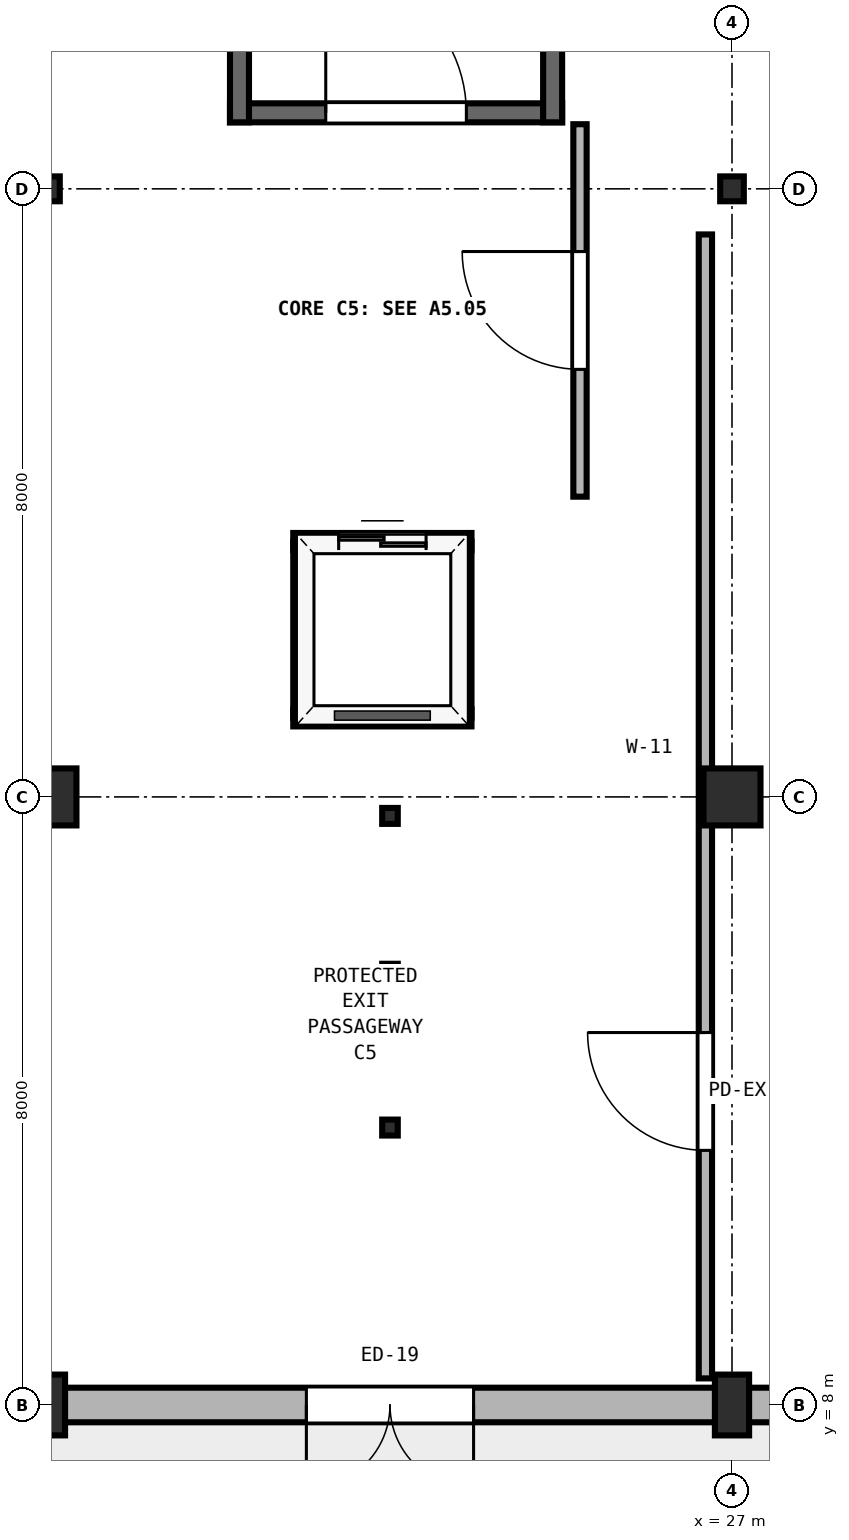
"""IFC4 building model, lengths in metres.
Left out: names, types, materials, properties, quantities, classifications, styles, units other than length and angle.
Written with IfcOpenShell. Run it as: python <this file> out.ifc"""

import sys

from ifc_helpers import new_model, si_unit, direction, frame, frame_2d, origin, origin_2d, place, context, subcontext, project, spatial, rectangle, i_section, extrude, element, fill, save


model = new_model("IFC4")
c1 = context("Model", 3, precision=1e-05, world=origin(), true_north=direction((0.0, 1.0)))
c2 = subcontext(c1, "Body", "Model", "MODEL_VIEW")
j1 = project(units=[si_unit("LENGTHUNIT", "METRE"), si_unit("PLANEANGLEUNIT", "RADIAN")], contexts=[c1])
p1 = place(None, origin())
s1 = spatial("IfcSite", under=j1, at=p1, CompositionType="ELEMENT")
p2 = place(p1, origin())
s2 = spatial("IfcBuilding", under=s1, at=p2, CompositionType="ELEMENT")
p3 = place(p2, origin())
s3 = spatial("IfcBuildingStorey", under=s2, at=p3, CompositionType="ELEMENT", Elevation=0.0)
p4 = place(p3, frame((18.0, 8.0, 0.0), z_axis=(0.0, 0.0, 1.0), x_axis=(1.0, 0.0, 0.0)))
e1 = element("IfcColumn", 1, at=p4, inside=s3, PredefinedType="PILASTER", context=c2, shape_type="SweptSolid", body=[
    extrude(rectangle(XDim=0.45, YDim=0.8, at=origin_2d()), origin(), (0.0, 0.0, 1.0), 5.12),
])
p5 = place(p3, frame((18.0, 16.0, 0.0), z_axis=(0.0, 0.0, 1.0), x_axis=(1.0, 0.0, 0.0)))
e2 = element("IfcColumn", 2, at=p5, inside=s3, PredefinedType="COLUMN", context=c2, shape_type="SweptSolid", body=[
    extrude(rectangle(XDim=0.75, YDim=0.75, at=origin_2d()), origin(), (0.0, 0.0, 1.0), 5.12),
])
p6 = place(p3, frame((18.0, 24.0, 0.0), z_axis=(0.0, 0.0, 1.0), x_axis=(1.0, 0.0, 0.0)))
e3 = element("IfcColumn", 3, at=p6, inside=s3, PredefinedType="COLUMN", context=c2, shape_type="SweptSolid", body=[
    extrude(i_section(OverallWidth=0.311, OverallDepth=0.327, WebThickness=0.016, FlangeThickness=0.025, FilletRadius=0.017, at=origin_2d()), origin(), (0.0, 0.0, 1.0), 5.12),
])
p7 = place(p3, frame((27.0, 8.0, 0.0), z_axis=(0.0, 0.0, 1.0), x_axis=(1.0, 0.0, 0.0)))
e4 = element("IfcColumn", 4, at=p7, inside=s3, PredefinedType="PILASTER", context=c2, shape_type="SweptSolid", body=[
    extrude(rectangle(XDim=0.45, YDim=0.8, at=origin_2d()), origin(), (0.0, 0.0, 1.0), 5.12),
])
p8 = place(p3, frame((27.0, 16.0, 0.0), z_axis=(0.0, 0.0, 1.0), x_axis=(1.0, 0.0, 0.0)))
e5 = element("IfcColumn", 5, at=p8, inside=s3, PredefinedType="COLUMN", context=c2, shape_type="SweptSolid", body=[
    extrude(rectangle(XDim=0.75, YDim=0.75, at=origin_2d()), origin(), (0.0, 0.0, 1.0), 5.12),
])
p9 = place(p3, frame((27.0, 24.0, 0.0), z_axis=(0.0, 0.0, 1.0), x_axis=(1.0, 0.0, 0.0)))
e6 = element("IfcColumn", 6, at=p9, inside=s3, PredefinedType="COLUMN", context=c2, shape_type="SweptSolid", body=[
    extrude(i_section(OverallWidth=0.311, OverallDepth=0.327, WebThickness=0.016, FlangeThickness=0.025, FilletRadius=0.017, at=origin_2d()), origin(), (0.0, 0.0, 1.0), 5.12),
])
for number, where, z_axis, x_axis in (
    (7, (22.5, 11.65, 0.0), (0.0, 0.0, 1.0), (1.0, 0.0, 0.0)),
    (8, (22.5, 13.7, 0.0), (0.0, 0.0, 1.0), (1.0, 0.0, 0.0)),
    (9, (22.5, 15.75, 0.0), (0.0, 0.0, 1.0), (1.0, 0.0, 0.0)),
    (10, (22.5, 17.8, 0.0), (0.0, 0.0, 1.0), (1.0, 0.0, 0.0)),
):
    element("IfcColumn", number, at=place(p3, frame(where, z_axis=z_axis, x_axis=x_axis)), inside=s3, PredefinedType="COLUMN", context=c2, shape_type="SweptSolid", body=[
        extrude(i_section(OverallWidth=0.205, OverallDepth=0.21, WebThickness=0.009, FlangeThickness=0.014, FilletRadius=0.011, at=origin_2d()), origin(), (0.0, 0.0, 1.0), 5.12),
    ])
p10 = place(p3, frame((26.779, 8.0, 0.0), z_axis=(0.0, 0.0, 1.0), x_axis=(-1.0, 0.0, 0.0)))
e11 = element("IfcWall", 11, at=p10, inside=s3, PredefinedType="SOLIDWALL", context=c2, shape_type="SweptSolid", body=[
    extrude(rectangle(XDim=8.558, YDim=0.455, at=frame_2d((4.279, 0.0))), origin(), (0.0, 0.0, 1.0), 4.731),
])
p11 = place(p10, frame((3.179, 0.0, 0.0)))
e12 = element("IfcOpeningElement", 12, at=p11, cuts=e11, PredefinedType="OPENING", context=c2, shape_type="SweptSolid", body=[
    extrude(rectangle(XDim=2.2, YDim=2.4, at=frame_2d((1.1, 1.2))), frame((0.0, 0.238, 0.0), z_axis=(0.0, -1.0, 0.0), x_axis=(1.0, 0.0, 0.0)), (0.0, 0.0, 1.0), 0.475),
])
p12 = place(p3, frame((27.221, 8.0, 0.0), z_axis=(0.0, 0.0, 1.0), x_axis=(1.0, 0.0, 0.0)))
e13 = element("IfcWall", 13, at=p12, inside=s3, PredefinedType="SOLIDWALL", context=c2, shape_type="SweptSolid", body=[
    extrude(rectangle(XDim=9.558, YDim=0.455, at=frame_2d((4.779, 0.0))), origin(), (0.0, 0.0, 1.0), 4.63),
])
p13 = place(p12, frame((2.286, 0.0, 0.85)))
e14 = element("IfcOpeningElement", 14, at=p13, cuts=e13, PredefinedType="OPENING", context=c2, shape_type="SweptSolid", body=[
    extrude(rectangle(XDim=1.8, YDim=2.65, at=frame_2d((0.9, 1.325))), frame((0.0, 0.238, 0.0), z_axis=(0.0, -1.0, 0.0), x_axis=(1.0, 0.0, 0.0)), (0.0, 0.0, 1.0), 0.475),
])
p14 = place(p12, frame((5.472, 0.0, 0.85)))
e15 = element("IfcOpeningElement", 15, at=p14, cuts=e13, PredefinedType="OPENING", context=c2, shape_type="SweptSolid", body=[
    extrude(rectangle(XDim=1.8, YDim=2.65, at=frame_2d((0.9, 1.325))), frame((0.0, 0.238, 0.0), z_axis=(0.0, -1.0, 0.0), x_axis=(1.0, 0.0, 0.0)), (0.0, 0.0, 1.0), 0.475),
])
p15 = place(p3, frame((20.395, 25.0, 0.0), z_axis=(0.0, 0.0, 1.0), x_axis=(1.0, 0.0, 0.0)))
e16 = element("IfcWall", 16, at=p15, inside=s3, PredefinedType="SHEAR", context=c2, shape_type="SweptSolid", body=[
    extrude(rectangle(XDim=4.37, YDim=0.25, at=frame_2d((2.185, 0.0))), origin(), (0.0, 0.0, 1.0), 5.12),
])
p16 = place(p15, frame((1.26, 0.0, 0.0)))
e17 = element("IfcOpeningElement", 17, at=p16, cuts=e16, PredefinedType="OPENING", context=c2, shape_type="SweptSolid", body=[
    extrude(rectangle(XDim=1.85, YDim=2.25, at=frame_2d((0.925, 1.125))), frame((0.0, 0.135, 0.0), z_axis=(0.0, -1.0, 0.0), x_axis=(1.0, 0.0, 0.0)), (0.0, 0.0, 1.0), 0.27),
])
for number, where, z_axis, x_axis in (
    (18, (20.52, 24.875, 0.0), (0.0, 0.0, 1.0), (0.0, 1.0, 0.0)),
    (19, (24.64, 24.875, 0.0), (0.0, 0.0, 1.0), (0.0, 1.0, 0.0)),
):
    element("IfcWall", number, at=place(p3, frame(where, z_axis=z_axis, x_axis=x_axis)), inside=s3, PredefinedType="SHEAR", context=c2, shape_type="SweptSolid", body=[
        extrude(rectangle(XDim=11.09, YDim=0.25, at=frame_2d((5.545, 0.0))), origin(), (0.0, 0.0, 1.0), 5.12),
    ])
p17 = place(p3, frame((25.0, 19.95, 0.0), z_axis=(0.0, 0.0, 1.0), x_axis=(0.0, 1.0, 0.0)))
e20 = element("IfcWall", 20, at=p17, inside=s3, PredefinedType="PARTITIONING", context=c2, shape_type="SweptSolid", body=[
    extrude(rectangle(XDim=4.9, YDim=0.175, at=frame_2d((2.45, 0.0))), origin(), (0.0, 0.0, 1.0), 5.07),
])
p18 = place(p17, frame((1.675, 0.0, 0.0)))
e21 = element("IfcOpeningElement", 21, at=p18, cuts=e20, PredefinedType="OPENING", context=c2, shape_type="SweptSolid", body=[
    extrude(rectangle(XDim=1.55, YDim=2.22, at=frame_2d((0.775, 1.11))), frame((0.0, 0.097, 0.0), z_axis=(0.0, -1.0, 0.0), x_axis=(1.0, 0.0, 0.0)), (0.0, 0.0, 1.0), 0.195),
])
p19 = place(p3, frame((21.228, 19.36, 0.0), z_axis=(0.0, 0.0, 1.0), x_axis=(1.0, 0.0, 0.0)))
e22 = element("IfcWall", 22, at=p19, inside=s3, PredefinedType="SOLIDWALL", context=c2, shape_type="SweptSolid", body=[
    extrude(rectangle(XDim=2.345, YDim=0.225, at=frame_2d((1.172, 0.0))), origin(), (0.0, 0.0, 1.0), 5.07),
])
p20 = place(p19, frame((0.597, 0.0, 0.0)))
e23 = element("IfcOpeningElement", 23, at=p20, cuts=e22, PredefinedType="OPENING", context=c2, shape_type="SweptSolid", body=[
    extrude(rectangle(XDim=1.15, YDim=2.2, at=frame_2d((0.575, 1.1))), frame((0.0, 0.123, 0.0), z_axis=(0.0, -1.0, 0.0), x_axis=(1.0, 0.0, 0.0)), (0.0, 0.0, 1.0), 0.245),
])
p21 = place(p3, frame((21.228, 17.04, 0.0), z_axis=(0.0, 0.0, 1.0), x_axis=(1.0, 0.0, 0.0)))
e24 = element("IfcWall", 24, at=p21, inside=s3, PredefinedType="SOLIDWALL", context=c2, shape_type="SweptSolid", body=[
    extrude(rectangle(XDim=2.345, YDim=0.225, at=frame_2d((1.172, 0.0))), origin(), (0.0, 0.0, 1.0), 5.07),
])
for number, where, z_axis, x_axis in (
    (25, (21.34, 17.04, 0.0), (0.0, 0.0, 1.0), (0.0, 1.0, 0.0)),
    (26, (23.46, 17.04, 0.0), (0.0, 0.0, 1.0), (0.0, 1.0, 0.0)),
):
    element("IfcWall", number, at=place(p3, frame(where, z_axis=z_axis, x_axis=x_axis)), inside=s3, PredefinedType="SOLIDWALL", context=c2, shape_type="SweptSolid", body=[
        extrude(rectangle(XDim=2.32, YDim=0.225, at=frame_2d((1.16, 0.0))), origin(), (0.0, 0.0, 1.0), 5.07),
    ])
p22 = place(p3, frame((26.65, 8.35, 0.0), z_axis=(0.0, 0.0, 1.0), x_axis=(0.0, 1.0, 0.0)))
e27 = element("IfcWall", 27, at=p22, inside=s3, PredefinedType="PARTITIONING", context=c2, shape_type="SweptSolid", body=[
    extrude(rectangle(XDim=15.05, YDim=0.175, at=frame_2d((7.525, 0.0))), origin(), (0.0, 0.0, 1.0), 5.08),
])
p23 = place(p22, frame((3.0, 0.0, 0.0)))
e28 = element("IfcOpeningElement", 28, at=p23, cuts=e27, PredefinedType="OPENING", context=c2, shape_type="SweptSolid", body=[
    extrude(rectangle(XDim=1.55, YDim=2.22, at=frame_2d((0.775, 1.11))), frame((0.0, 0.097, 0.0), z_axis=(0.0, -1.0, 0.0), x_axis=(1.0, 0.0, 0.0)), (0.0, 0.0, 1.0), 0.195),
])
p24 = place(p11, origin())
e29 = element("IfcDoor", 29, at=p24, inside=s3, OperationType="DOUBLE_DOOR_SINGLE_SWING", PredefinedType="DOOR", context=c2, shape_type="SweptSolid", body=[
    extrude(rectangle(XDim=2.2, YDim=2.4, at=frame_2d((1.1, 1.2))), frame((0.0, 0.025, 0.0), z_axis=(0.0, -1.0, 0.0), x_axis=(1.0, 0.0, 0.0)), (0.0, 0.0, 1.0), 0.05),
])
fill(e12, e29)
p25 = place(p16, origin())
e30 = element("IfcDoor", 30, at=p25, inside=s3, OperationType="SINGLE_SWING_LEFT", PredefinedType="DOOR", context=c2, shape_type="SweptSolid", body=[
    extrude(rectangle(XDim=1.85, YDim=2.25, at=frame_2d((0.925, 1.125))), frame((0.0, 0.025, 0.0), z_axis=(0.0, -1.0, 0.0), x_axis=(1.0, 0.0, 0.0)), (0.0, 0.0, 1.0), 0.05),
])
fill(e17, e30)
p26 = place(p18, origin())
e31 = element("IfcDoor", 31, at=p26, inside=s3, OperationType="SINGLE_SWING_RIGHT", PredefinedType="DOOR", context=c2, shape_type="SweptSolid", body=[
    extrude(rectangle(XDim=1.55, YDim=2.22, at=frame_2d((0.775, 1.11))), frame((0.0, 0.025, 0.0), z_axis=(0.0, -1.0, 0.0), x_axis=(1.0, 0.0, 0.0)), (0.0, 0.0, 1.0), 0.05),
])
fill(e21, e31)
p27 = place(p20, origin())
e32 = element("IfcDoor", 32, at=p27, inside=s3, OperationType="DOUBLE_DOOR_SLIDING", PredefinedType="DOOR", context=c2, shape_type="SweptSolid", body=[
    extrude(rectangle(XDim=1.15, YDim=2.2, at=frame_2d((0.575, 1.1))), frame((0.0, 0.025, 0.0), z_axis=(0.0, -1.0, 0.0), x_axis=(1.0, 0.0, 0.0)), (0.0, 0.0, 1.0), 0.05),
])
fill(e23, e32)
p28 = place(p23, origin())
e33 = element("IfcDoor", 33, at=p28, inside=s3, OperationType="SINGLE_SWING_RIGHT", PredefinedType="DOOR", context=c2, shape_type="SweptSolid", body=[
    extrude(rectangle(XDim=1.55, YDim=2.22, at=frame_2d((0.775, 1.11))), frame((0.0, 0.025, 0.0), z_axis=(0.0, -1.0, 0.0), x_axis=(1.0, 0.0, 0.0)), (0.0, 0.0, 1.0), 0.05),
])
fill(e28, e33)
save(model, sys.argv[1])
